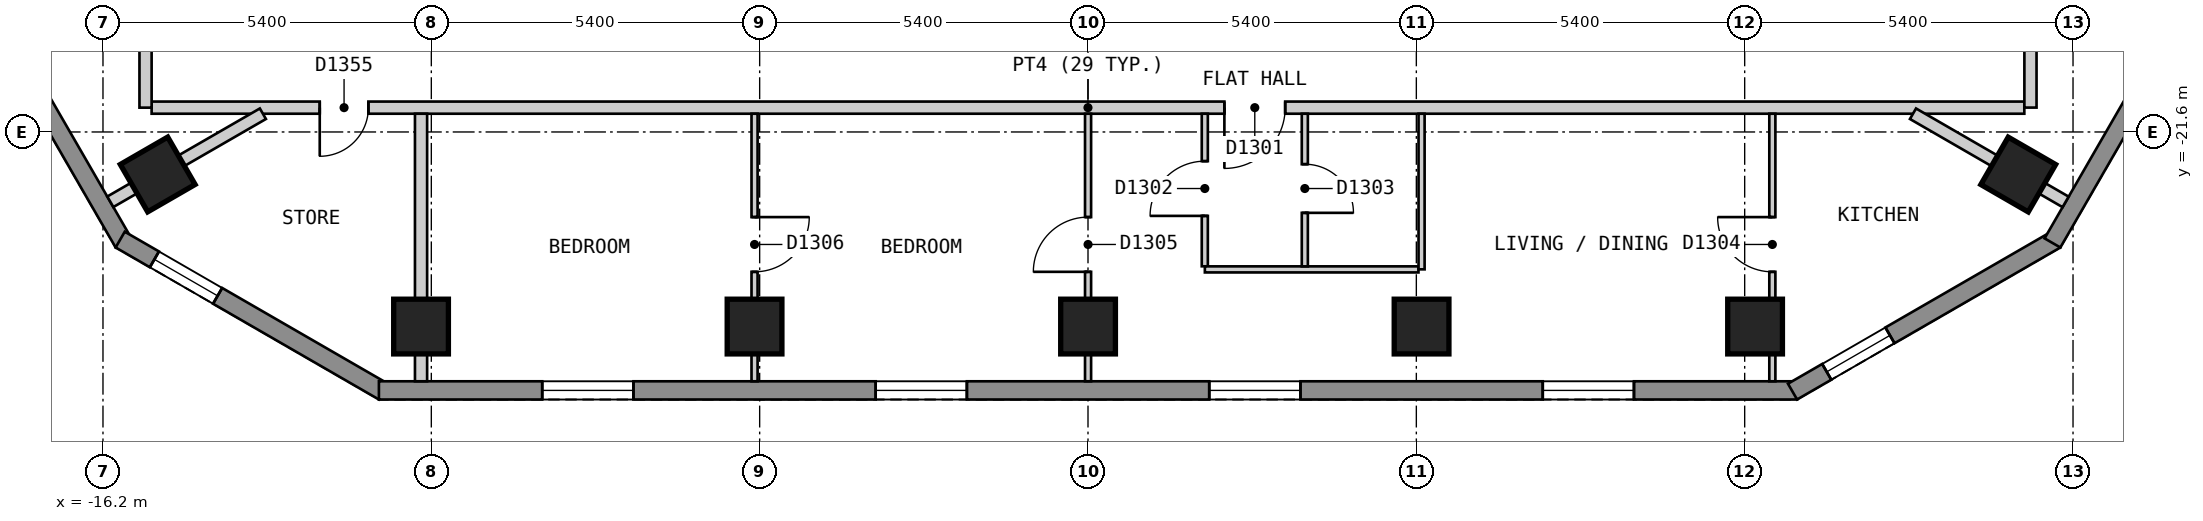
"""IFC4 building model, lengths in metres.
Left out: names, types, materials, properties, quantities, classifications, styles, units other than length and angle.
Written with IfcOpenShell. Run it as: python <this file> out.ifc"""

import sys

from ifc_helpers import new_model, si_unit, direction, frame, frame_2d, origin, origin_2d, place, context, subcontext, project, spatial, polyline, rectangle, outline, extrude, element, fill, save


model = new_model("IFC4")
c1 = context("Model", 3, precision=1e-05, world=origin(), true_north=direction((0.0, 1.0)))
c2 = subcontext(c1, "Body", "Model", "MODEL_VIEW")
j1 = project(units=[si_unit("LENGTHUNIT", "METRE"), si_unit("PLANEANGLEUNIT", "RADIAN")], contexts=[c1])
p1 = place(None, origin())
s1 = spatial("IfcSite", under=j1, at=p1, CompositionType="ELEMENT")
p2 = place(p1, origin())
s2 = spatial("IfcBuilding", under=s1, at=p2, CompositionType="ELEMENT")
p3 = place(p2, frame((0.0, 0.0, 147.6)))
s3 = spatial("IfcBuildingStorey", under=s2, at=p3, CompositionType="ELEMENT", Elevation=147.6)
for number, where, z_axis, x_axis in (
    (1, (-15.3, -22.299, 0.0), (0.0, 0.0, 1.0), (0.5, -0.866, 0.0)),
    (2, (-10.969, -24.8, 0.0), (0.0, 0.0, 1.0), (1.0, 0.0, 0.0)),
    (3, (-5.484, -24.8, 0.0), (0.0, 0.0, 1.0), (1.0, 0.0, 0.0)),
    (4, (0.001, -24.8, 0.0), (0.0, 0.0, 1.0), (1.0, 0.0, 0.0)),
    (5, (5.486, -24.8, 0.0), (0.0, 0.0, 1.0), (1.0, 0.0, 0.0)),
    (6, (10.971, -24.8, 0.0), (0.0, 0.0, 1.0), (1.0, 0.0, 0.0)),
    (7, (15.299, -22.3, 0.0), (0.0, 0.0, 1.0), (0.5, 0.866, 0.0)),
):
    element("IfcColumn", number, at=place(p3, frame(where, z_axis=z_axis, x_axis=x_axis)), inside=s3, PredefinedType="COLUMN", context=c2, shape_type="SweptSolid", body=[
        extrude(rectangle(XDim=0.9, YDim=0.9, at=origin_2d()), origin(), (0.0, 0.0, 1.0), 3.0),
    ])
p4 = place(p3, frame((-28.218, -2.025, 0.0), z_axis=(0.0, 0.0, 1.0), x_axis=(0.500017503135, -0.866015298109, 0.0)))
e8 = element("IfcWall", 8, at=p4, inside=s3, PredefinedType="SOLIDWALL", context=c2, shape_type="SweptSolid", body=[
    extrude(outline(polyline([(0.0, -0.15), (24.711, -0.15), (24.631, 0.15), (0.08, 0.15), (0.0, -0.15)])), origin(), (0.0, 0.0, 1.0), 2.7),
])
p5 = place(p4, frame((2.857, 0.0, 0.15)))
e9 = element("IfcOpeningElement", 9, at=p5, cuts=e8, PredefinedType="OPENING", context=c2, shape_type="SweptSolid", body=[
    extrude(rectangle(XDim=1.5, YDim=2.1, at=frame_2d((0.75, 1.05))), frame((0.0, 0.16, 0.0), z_axis=(0.0, -1.0, 0.0), x_axis=(1.0, 0.0, 0.0)), (0.0, 0.0, 1.0), 0.32),
])
p6 = place(p4, frame((8.689, 0.0, 0.15)))
e10 = element("IfcOpeningElement", 10, at=p6, cuts=e8, PredefinedType="OPENING", context=c2, shape_type="SweptSolid", body=[
    extrude(rectangle(XDim=1.5, YDim=2.1, at=frame_2d((0.75, 1.05))), frame((0.0, 0.16, 0.0), z_axis=(0.0, -1.0, 0.0), x_axis=(1.0, 0.0, 0.0)), (0.0, 0.0, 1.0), 0.32),
])
p7 = place(p4, frame((14.52, 0.0, 0.15)))
e11 = element("IfcOpeningElement", 11, at=p7, cuts=e8, PredefinedType="OPENING", context=c2, shape_type="SweptSolid", body=[
    extrude(rectangle(XDim=1.5, YDim=2.1, at=frame_2d((0.75, 1.05))), frame((0.0, 0.16, 0.0), z_axis=(0.0, -1.0, 0.0), x_axis=(1.0, 0.0, 0.0)), (0.0, 0.0, 1.0), 0.32),
])
p8 = place(p4, frame((20.351, 0.0, 0.15)))
e12 = element("IfcOpeningElement", 12, at=p8, cuts=e8, PredefinedType="OPENING", context=c2, shape_type="SweptSolid", body=[
    extrude(rectangle(XDim=1.5, YDim=2.1, at=frame_2d((0.75, 1.05))), frame((0.0, 0.16, 0.0), z_axis=(0.0, -1.0, 0.0), x_axis=(1.0, 0.0, 0.0)), (0.0, 0.0, 1.0), 0.32),
])
p9 = place(p3, frame((-15.917, -23.37, 0.0), z_axis=(0.0, 0.0, 1.0), x_axis=(0.866022959057, -0.500004234368, 0.0)))
e13 = element("IfcWall", 13, at=p9, inside=s3, PredefinedType="SOLIDWALL", context=c2, shape_type="SweptSolid", body=[
    extrude(outline(polyline([(0.0, -0.15), (5.0, -0.15), (4.92, 0.15), (0.08, 0.15), (0.0, -0.15)])), origin(), (0.0, 0.0, 1.0), 2.7),
])
p10 = place(p9, frame((0.65, 0.0, 0.15)))
e14 = element("IfcOpeningElement", 14, at=p10, cuts=e13, PredefinedType="OPENING", context=c2, shape_type="SweptSolid", body=[
    extrude(rectangle(XDim=1.2, YDim=2.1, at=frame_2d((0.6, 1.05))), frame((0.0, 0.16, 0.0), z_axis=(0.0, -1.0, 0.0), x_axis=(1.0, 0.0, 0.0)), (0.0, 0.0, 1.0), 0.32),
])
p11 = place(p3, frame((-11.662, -25.85, 0.0), z_axis=(0.0, 0.0, 1.0), x_axis=(1.0, 0.0, 0.0)))
e15 = element("IfcWall", 15, at=p11, inside=s3, PredefinedType="SOLIDWALL", context=c2, shape_type="SweptSolid", body=[
    extrude(outline(polyline([(0.0, -0.15), (23.324, -0.15), (23.244, 0.15), (0.08, 0.15), (0.0, -0.15)])), origin(), (0.0, 0.0, 1.0), 2.7),
])
p12 = place(p11, frame((2.686, 0.0, 0.15)))
e16 = element("IfcOpeningElement", 16, at=p12, cuts=e15, PredefinedType="OPENING", context=c2, shape_type="SweptSolid", body=[
    extrude(rectangle(XDim=1.5, YDim=2.1, at=frame_2d((0.75, 1.05))), frame((0.0, 0.16, 0.0), z_axis=(0.0, -1.0, 0.0), x_axis=(1.0, 0.0, 0.0)), (0.0, 0.0, 1.0), 0.32),
])
p13 = place(p11, frame((8.17, 0.0, 0.15)))
e17 = element("IfcOpeningElement", 17, at=p13, cuts=e15, PredefinedType="OPENING", context=c2, shape_type="SweptSolid", body=[
    extrude(rectangle(XDim=1.5, YDim=2.1, at=frame_2d((0.75, 1.05))), frame((0.0, 0.16, 0.0), z_axis=(0.0, -1.0, 0.0), x_axis=(1.0, 0.0, 0.0)), (0.0, 0.0, 1.0), 0.32),
])
p14 = place(p11, frame((13.656, 0.0, 0.15)))
e18 = element("IfcOpeningElement", 18, at=p14, cuts=e15, PredefinedType="OPENING", context=c2, shape_type="SweptSolid", body=[
    extrude(rectangle(XDim=1.5, YDim=2.1, at=frame_2d((0.75, 1.05))), frame((0.0, 0.16, 0.0), z_axis=(0.0, -1.0, 0.0), x_axis=(1.0, 0.0, 0.0)), (0.0, 0.0, 1.0), 0.32),
])
p15 = place(p11, frame((19.141, 0.0, 0.15)))
e19 = element("IfcOpeningElement", 19, at=p15, cuts=e15, PredefinedType="OPENING", context=c2, shape_type="SweptSolid", body=[
    extrude(rectangle(XDim=1.5, YDim=2.1, at=frame_2d((0.75, 1.05))), frame((0.0, 0.16, 0.0), z_axis=(0.0, -1.0, 0.0), x_axis=(1.0, 0.0, 0.0)), (0.0, 0.0, 1.0), 0.32),
])
p16 = place(p3, frame((11.587, -25.87, 0.0), z_axis=(0.0, 0.0, 1.0), x_axis=(0.866022959057, 0.500004234368, 0.0)))
e20 = element("IfcWall", 20, at=p16, inside=s3, PredefinedType="SOLIDWALL", context=c2, shape_type="SweptSolid", body=[
    extrude(outline(polyline([(0.0, -0.15), (5.0, -0.15), (4.92, 0.15), (0.08, 0.15), (0.0, -0.15)])), origin(), (0.0, 0.0, 1.0), 2.7),
])
p17 = place(p16, frame((0.65, 0.0, 0.15)))
e21 = element("IfcOpeningElement", 21, at=p17, cuts=e20, PredefinedType="OPENING", context=c2, shape_type="SweptSolid", body=[
    extrude(rectangle(XDim=1.2, YDim=2.1, at=frame_2d((0.6, 1.05))), frame((0.0, 0.16, 0.0), z_axis=(0.0, -1.0, 0.0), x_axis=(1.0, 0.0, 0.0)), (0.0, 0.0, 1.0), 0.32),
])
p18 = place(p3, frame((15.862, -23.425, 0.0), z_axis=(0.0, 0.0, 1.0), x_axis=(0.500017503135, 0.866015298109, 0.0)))
e22 = element("IfcWall", 22, at=p18, inside=s3, PredefinedType="SOLIDWALL", context=c2, shape_type="SweptSolid", body=[
    extrude(outline(polyline([(0.0, -0.15), (24.711, -0.15), (24.631, 0.15), (0.08, 0.15), (0.0, -0.15)])), origin(), (0.0, 0.0, 1.0), 2.7),
])
p19 = place(p18, frame((2.857, 0.0, 0.15)))
e23 = element("IfcOpeningElement", 23, at=p19, cuts=e22, PredefinedType="OPENING", context=c2, shape_type="SweptSolid", body=[
    extrude(rectangle(XDim=1.5, YDim=2.1, at=frame_2d((0.75, 1.05))), frame((0.0, 0.16, 0.0), z_axis=(0.0, -1.0, 0.0), x_axis=(1.0, 0.0, 0.0)), (0.0, 0.0, 1.0), 0.32),
])
p20 = place(p18, frame((8.689, 0.0, 0.15)))
e24 = element("IfcOpeningElement", 24, at=p20, cuts=e22, PredefinedType="OPENING", context=c2, shape_type="SweptSolid", body=[
    extrude(rectangle(XDim=1.5, YDim=2.1, at=frame_2d((0.75, 1.05))), frame((0.0, 0.16, 0.0), z_axis=(0.0, -1.0, 0.0), x_axis=(1.0, 0.0, 0.0)), (0.0, 0.0, 1.0), 0.32),
])
p21 = place(p18, frame((14.52, 0.0, 0.15)))
e25 = element("IfcOpeningElement", 25, at=p21, cuts=e22, PredefinedType="OPENING", context=c2, shape_type="SweptSolid", body=[
    extrude(rectangle(XDim=1.5, YDim=2.1, at=frame_2d((0.75, 1.05))), frame((0.0, 0.16, 0.0), z_axis=(0.0, -1.0, 0.0), x_axis=(1.0, 0.0, 0.0)), (0.0, 0.0, 1.0), 0.32),
])
p22 = place(p18, frame((20.351, 0.0, 0.15)))
e26 = element("IfcOpeningElement", 26, at=p22, cuts=e22, PredefinedType="OPENING", context=c2, shape_type="SweptSolid", body=[
    extrude(rectangle(XDim=1.5, YDim=2.1, at=frame_2d((0.75, 1.05))), frame((0.0, 0.16, 0.0), z_axis=(0.0, -1.0, 0.0), x_axis=(1.0, 0.0, 0.0)), (0.0, 0.0, 1.0), 0.32),
])
p23 = place(p3, frame((-15.4, -21.2, 0.0), z_axis=(0.0, 0.0, 1.0), x_axis=(1.0, 0.0, 0.0)))
e27 = element("IfcWall", 27, at=p23, inside=s3, PredefinedType="PARTITIONING", context=c2, shape_type="SweptSolid", body=[
    extrude(rectangle(XDim=30.799, YDim=0.2, at=frame_2d((15.399, 0.0))), origin(), (0.0, 0.0, 1.0), 2.7),
])
p24 = place(p23, frame((17.643, 0.0, 0.0)))
e28 = element("IfcOpeningElement", 28, at=p24, cuts=e27, PredefinedType="OPENING", context=c2, shape_type="SweptSolid", body=[
    extrude(rectangle(XDim=1.0, YDim=2.1, at=frame_2d((0.5, 1.05))), frame((0.0, 0.11, 0.0), z_axis=(0.0, -1.0, 0.0), x_axis=(1.0, 0.0, 0.0)), (0.0, 0.0, 1.0), 0.22),
])
p25 = place(p23, frame((2.765, 0.0, 0.0)))
e29 = element("IfcOpeningElement", 29, at=p25, cuts=e27, PredefinedType="OPENING", context=c2, shape_type="SweptSolid", body=[
    extrude(rectangle(XDim=0.8, YDim=2.1, at=frame_2d((0.4, 1.05))), frame((0.0, 0.11, 0.0), z_axis=(0.0, -1.0, 0.0), x_axis=(1.0, 0.0, 0.0)), (0.0, 0.0, 1.0), 0.22),
])
p26 = place(p3, frame((15.5, -21.199, 0.0), z_axis=(0.0, 0.0, 1.0), x_axis=(0.0, 1.0, 0.0)))
e30 = element("IfcWall", 30, at=p26, inside=s3, PredefinedType="PARTITIONING", context=c2, shape_type="SweptSolid", body=[
    extrude(rectangle(XDim=5.458, YDim=0.2, at=frame_2d((2.729, 0.0))), origin(), (0.0, 0.0, 1.0), 2.7),
])
p27 = place(p3, frame((-15.5, -21.2, 0.0), z_axis=(0.0, 0.0, 1.0), x_axis=(0.0, 1.0, 0.0)))
e31 = element("IfcWall", 31, at=p27, inside=s3, PredefinedType="PARTITIONING", context=c2, shape_type="SweptSolid", body=[
    extrude(rectangle(XDim=4.8, YDim=0.2, at=frame_2d((2.4, 0.0))), origin(), (0.0, 0.0, 1.0), 2.7),
])
p28 = place(p27, frame((1.94, 0.0, 0.0)))
e32 = element("IfcOpeningElement", 32, at=p28, cuts=e31, PredefinedType="OPENING", context=c2, shape_type="SweptSolid", body=[
    extrude(rectangle(XDim=0.8, YDim=2.1, at=frame_2d((0.4, 1.05))), frame((0.0, 0.11, 0.0), z_axis=(0.0, -1.0, 0.0), x_axis=(1.0, 0.0, 0.0)), (0.0, 0.0, 1.0), 0.22),
])
p29 = place(p3, frame((1.921, -21.3, 0.0), z_axis=(0.0, 0.0, 1.0), x_axis=(0.0, -1.0, 0.0)))
e33 = element("IfcWall", 33, at=p29, inside=s3, PredefinedType="PARTITIONING", context=c2, shape_type="SweptSolid", body=[
    extrude(rectangle(XDim=2.509, YDim=0.1, at=frame_2d((1.254, 0.0))), origin(), (0.0, 0.0, 1.0), 2.7),
])
p30 = place(p29, frame((0.78, 0.0, 0.0)))
e34 = element("IfcOpeningElement", 34, at=p30, cuts=e33, PredefinedType="OPENING", context=c2, shape_type="SweptSolid", body=[
    extrude(rectangle(XDim=0.9, YDim=2.1, at=frame_2d((0.45, 1.05))), frame((0.0, 0.06, 0.0), z_axis=(0.0, -1.0, 0.0), x_axis=(1.0, 0.0, 0.0)), (0.0, 0.0, 1.0), 0.12),
])
p31 = place(p3, frame((1.922, -23.86, 0.0), z_axis=(0.0, 0.0, 1.0), x_axis=(1.0, 0.0, 0.0)))
e35 = element("IfcWall", 35, at=p31, inside=s3, PredefinedType="PARTITIONING", context=c2, shape_type="SweptSolid", body=[
    extrude(rectangle(XDim=3.513, YDim=0.1, at=frame_2d((1.756, 0.0))), origin(), (0.0, 0.0, 1.0), 2.7),
])
p32 = place(p3, frame((3.566, -23.81, 0.0), z_axis=(0.0, 0.0, 1.0), x_axis=(0.0, 1.0, 0.0)))
e36 = element("IfcWall", 36, at=p32, inside=s3, PredefinedType="PARTITIONING", context=c2, shape_type="SweptSolid", body=[
    extrude(rectangle(XDim=2.51, YDim=0.1, at=frame_2d((1.255, 0.0))), origin(), (0.0, 0.0, 1.0), 2.7),
])
p33 = place(p32, frame((0.88, 0.0, 0.0)))
e37 = element("IfcOpeningElement", 37, at=p33, cuts=e36, PredefinedType="OPENING", context=c2, shape_type="SweptSolid", body=[
    extrude(rectangle(XDim=0.8, YDim=2.1, at=frame_2d((0.4, 1.05))), frame((0.0, 0.06, 0.0), z_axis=(0.0, -1.0, 0.0), x_axis=(1.0, 0.0, 0.0)), (0.0, 0.0, 1.0), 0.12),
])
p34 = place(p3, frame((5.486, -23.859, 0.0), z_axis=(0.0, 0.0, 1.0), x_axis=(0.0, 1.0, 0.0)))
e38 = element("IfcWall", 38, at=p34, inside=s3, PredefinedType="PARTITIONING", context=c2, shape_type="SweptSolid", body=[
    extrude(rectangle(XDim=2.559, YDim=0.1, at=frame_2d((1.279, 0.0))), origin(), (0.0, 0.0, 1.0), 2.7),
])
p35 = place(p3, frame((11.255, -25.7, 0.0), z_axis=(0.0, 0.0, 1.0), x_axis=(0.0, 1.0, 0.0)))
e39 = element("IfcWall", 39, at=p35, inside=s3, PredefinedType="PARTITIONING", context=c2, shape_type="SweptSolid", body=[
    extrude(rectangle(XDim=4.4, YDim=0.1, at=frame_2d((2.2, 0.0))), origin(), (0.0, 0.0, 1.0), 2.7),
])
p36 = place(p35, frame((1.8, 0.0, 0.0)))
e40 = element("IfcOpeningElement", 40, at=p36, cuts=e39, PredefinedType="OPENING", context=c2, shape_type="SweptSolid", body=[
    extrude(rectangle(XDim=0.9, YDim=2.1, at=frame_2d((0.45, 1.05))), frame((0.0, 0.06, 0.0), z_axis=(0.0, -1.0, 0.0), x_axis=(1.0, 0.0, 0.0)), (0.0, 0.0, 1.0), 0.12),
])
p37 = place(p3, frame((0.001, -25.7, 0.0), z_axis=(0.0, 0.0, 1.0), x_axis=(0.0, 1.0, 0.0)))
e41 = element("IfcWall", 41, at=p37, inside=s3, PredefinedType="PARTITIONING", context=c2, shape_type="SweptSolid", body=[
    extrude(rectangle(XDim=4.4, YDim=0.1, at=frame_2d((2.2, 0.0))), origin(), (0.0, 0.0, 1.0), 2.7),
])
p38 = place(p37, frame((1.8, 0.0, 0.0)))
e42 = element("IfcOpeningElement", 42, at=p38, cuts=e41, PredefinedType="OPENING", context=c2, shape_type="SweptSolid", body=[
    extrude(rectangle(XDim=0.9, YDim=2.1, at=frame_2d((0.45, 1.05))), frame((0.0, 0.06, 0.0), z_axis=(0.0, -1.0, 0.0), x_axis=(1.0, 0.0, 0.0)), (0.0, 0.0, 1.0), 0.12),
])
p39 = place(p3, frame((-5.484, -25.7, 0.0), z_axis=(0.0, 0.0, 1.0), x_axis=(0.0, 1.0, 0.0)))
e43 = element("IfcWall", 43, at=p39, inside=s3, PredefinedType="PARTITIONING", context=c2, shape_type="SweptSolid", body=[
    extrude(rectangle(XDim=4.4, YDim=0.1, at=frame_2d((2.2, 0.0))), origin(), (0.0, 0.0, 1.0), 2.7),
])
p40 = place(p39, frame((1.8, 0.0, 0.0)))
e44 = element("IfcOpeningElement", 44, at=p40, cuts=e43, PredefinedType="OPENING", context=c2, shape_type="SweptSolid", body=[
    extrude(rectangle(XDim=0.9, YDim=2.1, at=frame_2d((0.45, 1.05))), frame((0.0, 0.06, 0.0), z_axis=(0.0, -1.0, 0.0), x_axis=(1.0, 0.0, 0.0)), (0.0, 0.0, 1.0), 0.12),
])
p41 = place(p3, frame((13.568, -21.3, 0.0), z_axis=(0.0, 0.0, 1.0), x_axis=(0.865885342641, -0.500242514586, 0.0)))
e45 = element("IfcWall", 45, at=p41, inside=s3, PredefinedType="PARTITIONING", context=c2, shape_type="SweptSolid", body=[
    extrude(rectangle(XDim=2.898, YDim=0.2, at=frame_2d((1.449, 0.0))), origin(), (0.0, 0.0, 1.0), 2.7),
])
p42 = place(p3, frame((-10.969, -25.7, 0.0), z_axis=(0.0, 0.0, 1.0), x_axis=(0.0, 1.0, 0.0)))
e46 = element("IfcWall", 46, at=p42, inside=s3, PredefinedType="PARTITIONING", context=c2, shape_type="SweptSolid", body=[
    extrude(rectangle(XDim=4.4, YDim=0.2, at=frame_2d((2.2, 0.0))), origin(), (0.0, 0.0, 1.0), 2.7),
])
p43 = place(p3, frame((-16.079, -22.748, 0.0), z_axis=(0.0, 0.0, 1.0), x_axis=(0.866114021284, 0.499846478567, 0.0)))
e47 = element("IfcWall", 47, at=p43, inside=s3, PredefinedType="PARTITIONING", context=c2, shape_type="SweptSolid", body=[
    extrude(rectangle(XDim=2.897, YDim=0.2, at=frame_2d((1.448, 0.0))), origin(), (0.0, 0.0, 1.0), 2.7),
])
p44 = place(p10, origin())
e48 = element("IfcWindow", 48, at=p44, inside=s3, PartitioningType="SINGLE_PANEL", PredefinedType="WINDOW", context=c2, shape_type="SweptSolid", body=[
    extrude(rectangle(XDim=1.2, YDim=2.1, at=frame_2d((0.6, 1.05))), frame((0.0, 0.03, 0.0), z_axis=(0.0, -1.0, 0.0), x_axis=(1.0, 0.0, 0.0)), (0.0, 0.0, 1.0), 0.06),
])
fill(e14, e48)
p45 = place(p12, origin())
e49 = element("IfcWindow", 49, at=p45, inside=s3, PartitioningType="SINGLE_PANEL", PredefinedType="WINDOW", context=c2, shape_type="SweptSolid", body=[
    extrude(rectangle(XDim=1.5, YDim=2.1, at=frame_2d((0.75, 1.05))), frame((0.0, 0.03, 0.0), z_axis=(0.0, -1.0, 0.0), x_axis=(1.0, 0.0, 0.0)), (0.0, 0.0, 1.0), 0.06),
])
fill(e16, e49)
p46 = place(p13, origin())
e50 = element("IfcWindow", 50, at=p46, inside=s3, PartitioningType="SINGLE_PANEL", PredefinedType="WINDOW", context=c2, shape_type="SweptSolid", body=[
    extrude(rectangle(XDim=1.5, YDim=2.1, at=frame_2d((0.75, 1.05))), frame((0.0, 0.03, 0.0), z_axis=(0.0, -1.0, 0.0), x_axis=(1.0, 0.0, 0.0)), (0.0, 0.0, 1.0), 0.06),
])
fill(e17, e50)
p47 = place(p14, origin())
e51 = element("IfcWindow", 51, at=p47, inside=s3, PartitioningType="SINGLE_PANEL", PredefinedType="WINDOW", context=c2, shape_type="SweptSolid", body=[
    extrude(rectangle(XDim=1.5, YDim=2.1, at=frame_2d((0.75, 1.05))), frame((0.0, 0.03, 0.0), z_axis=(0.0, -1.0, 0.0), x_axis=(1.0, 0.0, 0.0)), (0.0, 0.0, 1.0), 0.06),
])
fill(e18, e51)
p48 = place(p15, origin())
e52 = element("IfcWindow", 52, at=p48, inside=s3, PartitioningType="SINGLE_PANEL", PredefinedType="WINDOW", context=c2, shape_type="SweptSolid", body=[
    extrude(rectangle(XDim=1.5, YDim=2.1, at=frame_2d((0.75, 1.05))), frame((0.0, 0.03, 0.0), z_axis=(0.0, -1.0, 0.0), x_axis=(1.0, 0.0, 0.0)), (0.0, 0.0, 1.0), 0.06),
])
fill(e19, e52)
p49 = place(p17, origin())
e53 = element("IfcWindow", 53, at=p49, inside=s3, PartitioningType="SINGLE_PANEL", PredefinedType="WINDOW", context=c2, shape_type="SweptSolid", body=[
    extrude(rectangle(XDim=1.2, YDim=2.1, at=frame_2d((0.6, 1.05))), frame((0.0, 0.03, 0.0), z_axis=(0.0, -1.0, 0.0), x_axis=(1.0, 0.0, 0.0)), (0.0, 0.0, 1.0), 0.06),
])
fill(e21, e53)
p50 = place(p24, origin())
e54 = element("IfcDoor", 54, at=p50, inside=s3, OperationType="SINGLE_SWING_LEFT", PredefinedType="DOOR", context=c2, shape_type="SweptSolid", body=[
    extrude(rectangle(XDim=1.0, YDim=2.1, at=frame_2d((0.5, 1.05))), frame((0.0, 0.025, 0.0), z_axis=(0.0, -1.0, 0.0), x_axis=(1.0, 0.0, 0.0)), (0.0, 0.0, 1.0), 0.05),
])
fill(e28, e54)
p51 = place(p30, origin())
e55 = element("IfcDoor", 55, at=p51, inside=s3, OperationType="SINGLE_SWING_RIGHT", PredefinedType="DOOR", context=c2, shape_type="SweptSolid", body=[
    extrude(rectangle(XDim=0.9, YDim=2.1, at=frame_2d((0.45, 1.05))), frame((0.0, 0.025, 0.0), z_axis=(0.0, -1.0, 0.0), x_axis=(1.0, 0.0, 0.0)), (0.0, 0.0, 1.0), 0.05),
])
fill(e34, e55)
p52 = place(p33, origin())
e56 = element("IfcDoor", 56, at=p52, inside=s3, OperationType="SINGLE_SWING_LEFT", PredefinedType="DOOR", context=c2, shape_type="SweptSolid", body=[
    extrude(rectangle(XDim=0.8, YDim=2.1, at=frame_2d((0.4, 1.05))), frame((0.0, 0.025, 0.0), z_axis=(0.0, -1.0, 0.0), x_axis=(1.0, 0.0, 0.0)), (0.0, 0.0, 1.0), 0.05),
])
fill(e37, e56)
p53 = place(p36, origin())
e57 = element("IfcDoor", 57, at=p53, inside=s3, OperationType="SINGLE_SWING_RIGHT", PredefinedType="DOOR", context=c2, shape_type="SweptSolid", body=[
    extrude(rectangle(XDim=0.9, YDim=2.1, at=frame_2d((0.45, 1.05))), frame((0.0, 0.025, 0.0), z_axis=(0.0, -1.0, 0.0), x_axis=(1.0, 0.0, 0.0)), (0.0, 0.0, 1.0), 0.05),
])
fill(e40, e57)
p54 = place(p38, origin())
e58 = element("IfcDoor", 58, at=p54, inside=s3, OperationType="SINGLE_SWING_LEFT", PredefinedType="DOOR", context=c2, shape_type="SweptSolid", body=[
    extrude(rectangle(XDim=0.9, YDim=2.1, at=frame_2d((0.45, 1.05))), frame((0.0, 0.025, 0.0), z_axis=(0.0, -1.0, 0.0), x_axis=(1.0, 0.0, 0.0)), (0.0, 0.0, 1.0), 0.05),
])
fill(e42, e58)
p55 = place(p40, origin())
e59 = element("IfcDoor", 59, at=p55, inside=s3, OperationType="SINGLE_SWING_RIGHT", PredefinedType="DOOR", context=c2, shape_type="SweptSolid", body=[
    extrude(rectangle(XDim=0.9, YDim=2.1, at=frame_2d((0.45, 1.05))), frame((0.0, 0.025, 0.0), z_axis=(0.0, -1.0, 0.0), x_axis=(1.0, 0.0, 0.0)), (0.0, 0.0, 1.0), 0.05),
])
fill(e44, e59)
p56 = place(p25, origin())
e60 = element("IfcDoor", 60, at=p56, inside=s3, OperationType="SINGLE_SWING_LEFT", PredefinedType="DOOR", context=c2, shape_type="SweptSolid", body=[
    extrude(rectangle(XDim=0.8, YDim=2.1, at=frame_2d((0.4, 1.05))), frame((0.0, 0.025, 0.0), z_axis=(0.0, -1.0, 0.0), x_axis=(1.0, 0.0, 0.0)), (0.0, 0.0, 1.0), 0.05),
])
fill(e29, e60)
save(model, sys.argv[1])
